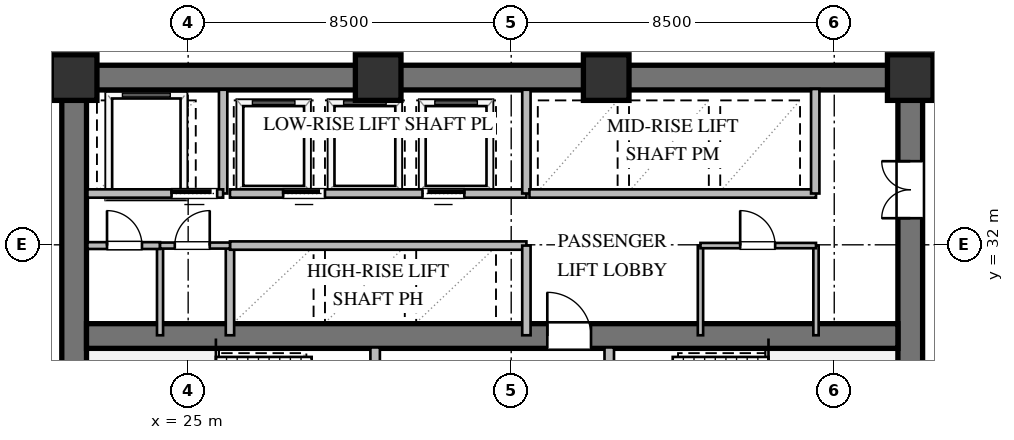
"""IFC4 building model, lengths in metres.
Left out: names, types, materials, properties, quantities, classifications, styles, units other than length and angle.
Written with IfcOpenShell. Run it as: python <this file> out.ifc"""

import sys

from ifc_helpers import new_model, si_unit, direction, frame, frame_2d, origin, origin_2d, place, context, subcontext, project, spatial, rectangle, extrude, element, fill, save


model = new_model("IFC4")
c1 = context("Model", 3, precision=1e-05, world=origin(), true_north=direction((0.0, 1.0)))
c2 = subcontext(c1, "Body", "Model", "MODEL_VIEW")
j1 = project(units=[si_unit("LENGTHUNIT", "METRE"), si_unit("PLANEANGLEUNIT", "RADIAN")], contexts=[c1])
p1 = place(None, origin())
s1 = spatial("IfcSite", under=j1, at=p1, CompositionType="ELEMENT")
p2 = place(p1, origin())
s2 = spatial("IfcBuilding", under=s1, at=p2, CompositionType="ELEMENT")
p3 = place(p2, frame((0.0, 0.0, 34.8)))
s3 = spatial("IfcBuildingStorey", under=s2, at=p3, CompositionType="ELEMENT", Elevation=34.8)
p4 = place(p3, frame((21.675, 36.4, 0.0), z_axis=(0.0, 0.0, 1.0), x_axis=(1.0, 0.0, 0.0)))
e1 = element("IfcWall", 1, at=p4, inside=s3, PredefinedType="SHEAR", context=c2, shape_type="SweptSolid", body=[
    extrude(rectangle(XDim=22.65, YDim=0.65, at=frame_2d((11.325, 0.0))), origin(), (0.0, 0.0, 1.0), 3.36),
])
p5 = place(p3, frame((22.0, 23.925, 0.0), z_axis=(0.0, 0.0, 1.0), x_axis=(0.0, 1.0, 0.0)))
e2 = element("IfcWall", 2, at=p5, inside=s3, PredefinedType="SHEAR", context=c2, shape_type="SweptSolid", body=[
    extrude(rectangle(XDim=12.15, YDim=0.65, at=frame_2d((6.075, 0.0))), origin(), (0.0, 0.0, 1.0), 3.36),
])
p6 = place(p3, frame((44.0, 23.925, 0.0), z_axis=(0.0, 0.0, 1.0), x_axis=(0.0, 1.0, 0.0)))
e3 = element("IfcWall", 3, at=p6, inside=s3, PredefinedType="SHEAR", context=c2, shape_type="SweptSolid", body=[
    extrude(rectangle(XDim=12.15, YDim=0.65, at=frame_2d((6.075, 0.0))), origin(), (0.0, 0.0, 1.0), 3.36),
])
p7 = place(p6, frame((8.775, 0.0, 0.0)))
e4 = element("IfcOpeningElement", 4, at=p7, cuts=e3, PredefinedType="OPENING", context=c2, shape_type="SweptSolid", body=[
    extrude(rectangle(XDim=1.5, YDim=2.15, at=frame_2d((0.75, 1.075))), frame((0.0, 0.335, 0.0), z_axis=(0.0, -1.0, 0.0), x_axis=(1.0, 0.0, 0.0)), (0.0, 0.0, 1.0), 0.67),
])
p8 = place(p3, frame((22.325, 29.6, 0.0), z_axis=(0.0, 0.0, 1.0), x_axis=(1.0, 0.0, 0.0)))
e5 = element("IfcWall", 5, at=p8, inside=s3, PredefinedType="SHEAR", context=c2, shape_type="SweptSolid", body=[
    extrude(rectangle(XDim=21.35, YDim=0.65, at=frame_2d((10.675, 0.0))), origin(), (0.0, 0.0, 1.0), 3.36),
])
p9 = place(p8, frame((12.125, 0.0, 0.0)))
e6 = element("IfcOpeningElement", 6, at=p9, cuts=e5, PredefinedType="OPENING", context=c2, shape_type="SweptSolid", body=[
    extrude(rectangle(XDim=1.15, YDim=2.1, at=frame_2d((0.575, 1.05))), frame((0.0, 0.335, 0.0), z_axis=(0.0, -1.0, 0.0), x_axis=(1.0, 0.0, 0.0)), (0.0, 0.0, 1.0), 0.67),
])
for number, where, z_axis, x_axis in (
    (7, (44.0, 36.4, 0.0), (0.0, 0.0, 1.0), (1.0, 0.0, 0.0)),
    (8, (36.0, 36.4, 0.0), (0.0, 0.0, 1.0), (1.0, 0.0, 0.0)),
    (9, (30.0, 36.4, 0.0), (0.0, 0.0, 1.0), (1.0, 0.0, 0.0)),
    (10, (22.0, 36.4, 0.0), (0.0, 0.0, 1.0), (1.0, 0.0, 0.0)),
):
    element("IfcColumn", number, at=place(p3, frame(where, z_axis=z_axis, x_axis=x_axis)), inside=s3, PredefinedType="COLUMN", context=c2, shape_type="SweptSolid", body=[
        extrude(rectangle(XDim=1.2, YDim=1.2, at=origin_2d()), origin(), (0.0, 0.0, 1.0), 3.6),
    ])
p10 = place(p3, frame((29.92, 23.9, 0.0), z_axis=(0.0, 0.0, 1.0), x_axis=(0.0, 1.0, 0.0)))
e11 = element("IfcWall", 11, at=p10, inside=s3, PredefinedType="SOLIDWALL", context=c2, shape_type="SweptSolid", body=[
    extrude(rectangle(XDim=5.4, YDim=0.25, at=frame_2d((2.7, 0.0))), origin(), (0.0, 0.0, 1.0), 3.36),
])
p11 = place(p10, frame((3.421, 0.0, 0.0)))
e12 = element("IfcOpeningElement", 12, at=p11, cuts=e11, PredefinedType="OPENING", context=c2, shape_type="SweptSolid", body=[
    extrude(rectangle(XDim=1.15, YDim=2.1, at=frame_2d((0.575, 1.05))), frame((0.0, 0.135, 0.0), z_axis=(0.0, -1.0, 0.0), x_axis=(1.0, 0.0, 0.0)), (0.0, 0.0, 1.0), 0.27),
])
p12 = place(p3, frame((36.08, 23.9, 0.0), z_axis=(0.0, 0.0, 1.0), x_axis=(0.0, 1.0, 0.0)))
e13 = element("IfcWall", 13, at=p12, inside=s3, PredefinedType="SOLIDWALL", context=c2, shape_type="SweptSolid", body=[
    extrude(rectangle(XDim=5.4, YDim=0.25, at=frame_2d((2.7, 0.0))), origin(), (0.0, 0.0, 1.0), 3.36),
])
p13 = place(p12, frame((3.421, 0.0, 0.0)))
e14 = element("IfcOpeningElement", 14, at=p13, cuts=e13, PredefinedType="OPENING", context=c2, shape_type="SweptSolid", body=[
    extrude(rectangle(XDim=1.15, YDim=2.1, at=frame_2d((0.575, 1.05))), frame((0.0, 0.135, 0.0), z_axis=(0.0, -1.0, 0.0), x_axis=(1.0, 0.0, 0.0)), (0.0, 0.0, 1.0), 0.27),
])
p14 = place(p3, frame((25.92, 33.35, 0.0), z_axis=(0.0, 0.0, 1.0), x_axis=(0.0, 1.0, 0.0)))
e15 = element("IfcWall", 15, at=p14, inside=s3, PredefinedType="SOLIDWALL", context=c2, shape_type="SweptSolid", body=[
    extrude(rectangle(XDim=2.73, YDim=0.22, at=frame_2d((1.365, 0.0))), origin(), (0.0, 0.0, 1.0), 3.36),
])
p15 = place(p3, frame((22.35, 33.35, 0.0), z_axis=(0.0, 0.0, 1.0), x_axis=(1.0, 0.0, 0.0)))
e16 = element("IfcWall", 16, at=p15, inside=s3, PredefinedType="SOLIDWALL", context=c2, shape_type="SweptSolid", body=[
    extrude(rectangle(XDim=3.57, YDim=0.22, at=frame_2d((1.785, 0.0))), origin(), (0.0, 0.0, 1.0), 3.36),
])
p16 = place(p15, frame((2.213, 0.0, 0.0)))
e17 = element("IfcOpeningElement", 17, at=p16, cuts=e16, PredefinedType="OPENING", context=c2, shape_type="SweptSolid", body=[
    extrude(rectangle(XDim=1.2, YDim=2.1, at=frame_2d((0.6, 1.05))), frame((0.0, 0.12, 0.0), z_axis=(0.0, -1.0, 0.0), x_axis=(1.0, 0.0, 0.0)), (0.0, 0.0, 1.0), 0.24),
])
p17 = place(p3, frame((26.1, 29.62, 0.0), z_axis=(0.0, 0.0, 1.0), x_axis=(0.0, 1.0, 0.0)))
e18 = element("IfcWall", 18, at=p17, inside=s3, PredefinedType="SOLIDWALL", context=c2, shape_type="SweptSolid", body=[
    extrude(rectangle(XDim=2.36, YDim=0.22, at=frame_2d((1.18, 0.0))), origin(), (0.0, 0.0, 1.0), 3.36),
])
p18 = place(p3, frame((26.1, 31.98, 0.0), z_axis=(0.0, 0.0, 1.0), x_axis=(1.0, 0.0, 0.0)))
e19 = element("IfcWall", 19, at=p18, inside=s3, PredefinedType="SOLIDWALL", context=c2, shape_type="SweptSolid", body=[
    extrude(rectangle(XDim=7.8, YDim=0.22, at=frame_2d((3.9, 0.0))), origin(), (0.0, 0.0, 1.0), 3.36),
])
p19 = place(p3, frame((33.9, 29.62, 0.0), z_axis=(0.0, 0.0, 1.0), x_axis=(0.0, 1.0, 0.0)))
e20 = element("IfcWall", 20, at=p19, inside=s3, PredefinedType="SOLIDWALL", context=c2, shape_type="SweptSolid", body=[
    extrude(rectangle(XDim=2.36, YDim=0.22, at=frame_2d((1.18, 0.0))), origin(), (0.0, 0.0, 1.0), 3.36),
])
p20 = place(p3, frame((26.1, 33.35, 0.0), z_axis=(0.0, 0.0, 1.0), x_axis=(1.0, 0.0, 0.0)))
e21 = element("IfcWall", 21, at=p20, inside=s3, PredefinedType="SOLIDWALL", context=c2, shape_type="SweptSolid", body=[
    extrude(rectangle(XDim=7.8, YDim=0.22, at=frame_2d((3.9, 0.0))), origin(), (0.0, 0.0, 1.0), 3.36),
])
p21 = place(p20, frame((1.4, 0.0, 0.0)))
e22 = element("IfcOpeningElement", 22, at=p21, cuts=e21, PredefinedType="OPENING", context=c2, shape_type="SweptSolid", body=[
    extrude(rectangle(XDim=1.1, YDim=2.1, at=frame_2d((0.55, 1.05))), frame((0.0, 0.12, 0.0), z_axis=(0.0, -1.0, 0.0), x_axis=(1.0, 0.0, 0.0)), (0.0, 0.0, 1.0), 0.24),
])
p22 = place(p20, frame((5.066, 0.0, 0.0)))
e23 = element("IfcOpeningElement", 23, at=p22, cuts=e21, PredefinedType="OPENING", context=c2, shape_type="SweptSolid", body=[
    extrude(rectangle(XDim=1.1, YDim=2.1, at=frame_2d((0.55, 1.05))), frame((0.0, 0.12, 0.0), z_axis=(0.0, -1.0, 0.0), x_axis=(1.0, 0.0, 0.0)), (0.0, 0.0, 1.0), 0.24),
])
p23 = place(p3, frame((33.9, 33.35, 0.0), z_axis=(0.0, 0.0, 1.0), x_axis=(0.0, 1.0, 0.0)))
e24 = element("IfcWall", 24, at=p23, inside=s3, PredefinedType="SOLIDWALL", context=c2, shape_type="SweptSolid", body=[
    extrude(rectangle(XDim=2.73, YDim=0.22, at=frame_2d((1.365, 0.0))), origin(), (0.0, 0.0, 1.0), 3.36),
])
p24 = place(p3, frame((33.98, 33.35, 0.0), z_axis=(0.0, 0.0, 1.0), x_axis=(1.0, 0.0, 0.0)))
e25 = element("IfcWall", 25, at=p24, inside=s3, PredefinedType="SOLIDWALL", context=c2, shape_type="SweptSolid", body=[
    extrude(rectangle(XDim=7.54, YDim=0.22, at=frame_2d((3.77, 0.0))), origin(), (0.0, 0.0, 1.0), 3.36),
])
p25 = place(p3, frame((41.5, 33.35, 0.0), z_axis=(0.0, 0.0, 1.0), x_axis=(0.0, 1.0, 0.0)))
e26 = element("IfcWall", 26, at=p25, inside=s3, PredefinedType="SOLIDWALL", context=c2, shape_type="SweptSolid", body=[
    extrude(rectangle(XDim=2.75, YDim=0.22, at=frame_2d((1.375, 0.0))), origin(), (0.0, 0.0, 1.0), 3.36),
])
p26 = place(p3, frame((24.26, 29.62, 0.0), z_axis=(0.0, 0.0, 1.0), x_axis=(0.0, 1.0, 0.0)))
e27 = element("IfcWall", 27, at=p26, inside=s3, PredefinedType="PLUMBINGWALL", context=c2, shape_type="SweptSolid", body=[
    extrude(rectangle(XDim=2.36, YDim=0.16, at=frame_2d((1.18, 0.0))), origin(), (0.0, 0.0, 1.0), 3.36),
])
p27 = place(p3, frame((22.35, 31.98, 0.0), z_axis=(0.0, 0.0, 1.0), x_axis=(1.0, 0.0, 0.0)))
e28 = element("IfcWall", 28, at=p27, inside=s3, PredefinedType="PARTITIONING", context=c2, shape_type="SweptSolid", body=[
    extrude(rectangle(XDim=1.91, YDim=0.18, at=frame_2d((0.955, 0.0))), origin(), (0.0, 0.0, 1.0), 3.36),
])
p28 = place(p27, frame((0.515, 0.0, 0.0)))
e29 = element("IfcOpeningElement", 29, at=p28, cuts=e28, PredefinedType="OPENING", context=c2, shape_type="SweptSolid", body=[
    extrude(rectangle(XDim=0.92, YDim=2.1, at=frame_2d((0.46, 1.05))), frame((0.0, 0.1, 0.0), z_axis=(0.0, -1.0, 0.0), x_axis=(1.0, 0.0, 0.0)), (0.0, 0.0, 1.0), 0.2),
])
p29 = place(p3, frame((24.26, 31.98, 0.0), z_axis=(0.0, 0.0, 1.0), x_axis=(1.0, 0.0, 0.0)))
e30 = element("IfcWall", 30, at=p29, inside=s3, PredefinedType="PLUMBINGWALL", context=c2, shape_type="SweptSolid", body=[
    extrude(rectangle(XDim=1.84, YDim=0.16, at=frame_2d((0.92, 0.0))), origin(), (0.0, 0.0, 1.0), 3.36),
])
p30 = place(p29, frame((0.388, 0.0, 0.0)))
e31 = element("IfcOpeningElement", 31, at=p30, cuts=e30, PredefinedType="OPENING", context=c2, shape_type="SweptSolid", body=[
    extrude(rectangle(XDim=0.92, YDim=2.1, at=frame_2d((0.46, 1.05))), frame((0.0, 0.09, 0.0), z_axis=(0.0, -1.0, 0.0), x_axis=(1.0, 0.0, 0.0)), (0.0, 0.0, 1.0), 0.18),
])
for number, where, z_axis, x_axis in (
    (32, (38.48, 29.62, 0.0), (0.0, 0.0, 1.0), (0.0, 1.0, 0.0)),
    (33, (41.52, 29.62, 0.0), (0.0, 0.0, 1.0), (0.0, 1.0, 0.0)),
):
    element("IfcWall", number, at=place(p3, frame(where, z_axis=z_axis, x_axis=x_axis)), inside=s3, PredefinedType="PARTITIONING", context=c2, shape_type="SweptSolid", body=[
        extrude(rectangle(XDim=2.36, YDim=0.14, at=frame_2d((1.18, 0.0))), origin(), (0.0, 0.0, 1.0), 3.36),
    ])
p31 = place(p3, frame((38.48, 31.98, 0.0), z_axis=(0.0, 0.0, 1.0), x_axis=(1.0, 0.0, 0.0)))
e34 = element("IfcWall", 34, at=p31, inside=s3, PredefinedType="PARTITIONING", context=c2, shape_type="SweptSolid", body=[
    extrude(rectangle(XDim=3.04, YDim=0.14, at=frame_2d((1.52, 0.0))), origin(), (0.0, 0.0, 1.0), 3.36),
])
p32 = place(p31, frame((1.045, 0.0, 0.0)))
e35 = element("IfcOpeningElement", 35, at=p32, cuts=e34, PredefinedType="OPENING", context=c2, shape_type="SweptSolid", body=[
    extrude(rectangle(XDim=0.92, YDim=2.1, at=frame_2d((0.46, 1.05))), frame((0.0, 0.08, 0.0), z_axis=(0.0, -1.0, 0.0), x_axis=(1.0, 0.0, 0.0)), (0.0, 0.0, 1.0), 0.16),
])
p33 = place(p9, origin())
e36 = element("IfcDoor", 36, at=p33, inside=s3, OperationType="SINGLE_SWING_LEFT", PredefinedType="DOOR", context=c2, shape_type="SweptSolid", body=[
    extrude(rectangle(XDim=1.15, YDim=2.1, at=frame_2d((0.575, 1.05))), frame((0.0, 0.025, 0.0), z_axis=(0.0, -1.0, 0.0), x_axis=(1.0, 0.0, 0.0)), (0.0, 0.0, 1.0), 0.05),
])
fill(e6, e36)
p34 = place(p7, origin())
e37 = element("IfcDoor", 37, at=p34, inside=s3, OperationType="DOUBLE_DOOR_SINGLE_SWING", PredefinedType="DOOR", context=c2, shape_type="SweptSolid", body=[
    extrude(rectangle(XDim=1.5, YDim=2.15, at=frame_2d((0.75, 1.075))), frame((0.0, 0.025, 0.0), z_axis=(0.0, -1.0, 0.0), x_axis=(1.0, 0.0, 0.0)), (0.0, 0.0, 1.0), 0.05),
])
fill(e4, e37)
p35 = place(p16, origin())
e38 = element("IfcDoor", 38, at=p35, inside=s3, OperationType="SLIDING_TO_LEFT", PredefinedType="DOOR", context=c2, shape_type="SweptSolid", body=[
    extrude(rectangle(XDim=1.2, YDim=2.1, at=frame_2d((0.6, 1.05))), frame((0.0, 0.025, 0.0), z_axis=(0.0, -1.0, 0.0), x_axis=(1.0, 0.0, 0.0)), (0.0, 0.0, 1.0), 0.05),
])
fill(e17, e38)
p36 = place(p21, origin())
e39 = element("IfcDoor", 39, at=p36, inside=s3, OperationType="SLIDING_TO_LEFT", PredefinedType="DOOR", context=c2, shape_type="SweptSolid", body=[
    extrude(rectangle(XDim=1.1, YDim=2.1, at=frame_2d((0.55, 1.05))), frame((0.0, 0.025, 0.0), z_axis=(0.0, -1.0, 0.0), x_axis=(1.0, 0.0, 0.0)), (0.0, 0.0, 1.0), 0.05),
])
fill(e22, e39)
p37 = place(p22, origin())
e40 = element("IfcDoor", 40, at=p37, inside=s3, OperationType="SLIDING_TO_RIGHT", PredefinedType="DOOR", context=c2, shape_type="SweptSolid", body=[
    extrude(rectangle(XDim=1.1, YDim=2.1, at=frame_2d((0.55, 1.05))), frame((0.0, 0.025, 0.0), z_axis=(0.0, -1.0, 0.0), x_axis=(1.0, 0.0, 0.0)), (0.0, 0.0, 1.0), 0.05),
])
fill(e23, e40)
p38 = place(p28, origin())
e41 = element("IfcDoor", 41, at=p38, inside=s3, OperationType="SINGLE_SWING_LEFT", PredefinedType="DOOR", context=c2, shape_type="SweptSolid", body=[
    extrude(rectangle(XDim=0.92, YDim=2.1, at=frame_2d((0.46, 1.05))), frame((0.0, 0.025, 0.0), z_axis=(0.0, -1.0, 0.0), x_axis=(1.0, 0.0, 0.0)), (0.0, 0.0, 1.0), 0.05),
])
fill(e29, e41)
p39 = place(p30, origin())
e42 = element("IfcDoor", 42, at=p39, inside=s3, OperationType="SINGLE_SWING_RIGHT", PredefinedType="DOOR", context=c2, shape_type="SweptSolid", body=[
    extrude(rectangle(XDim=0.92, YDim=2.1, at=frame_2d((0.46, 1.05))), frame((0.0, 0.025, 0.0), z_axis=(0.0, -1.0, 0.0), x_axis=(1.0, 0.0, 0.0)), (0.0, 0.0, 1.0), 0.05),
])
fill(e31, e42)
p40 = place(p32, origin())
e43 = element("IfcDoor", 43, at=p40, inside=s3, OperationType="SINGLE_SWING_LEFT", PredefinedType="DOOR", context=c2, shape_type="SweptSolid", body=[
    extrude(rectangle(XDim=0.92, YDim=2.1, at=frame_2d((0.46, 1.05))), frame((0.0, 0.025, 0.0), z_axis=(0.0, -1.0, 0.0), x_axis=(1.0, 0.0, 0.0)), (0.0, 0.0, 1.0), 0.05),
])
fill(e35, e43)
save(model, sys.argv[1])
